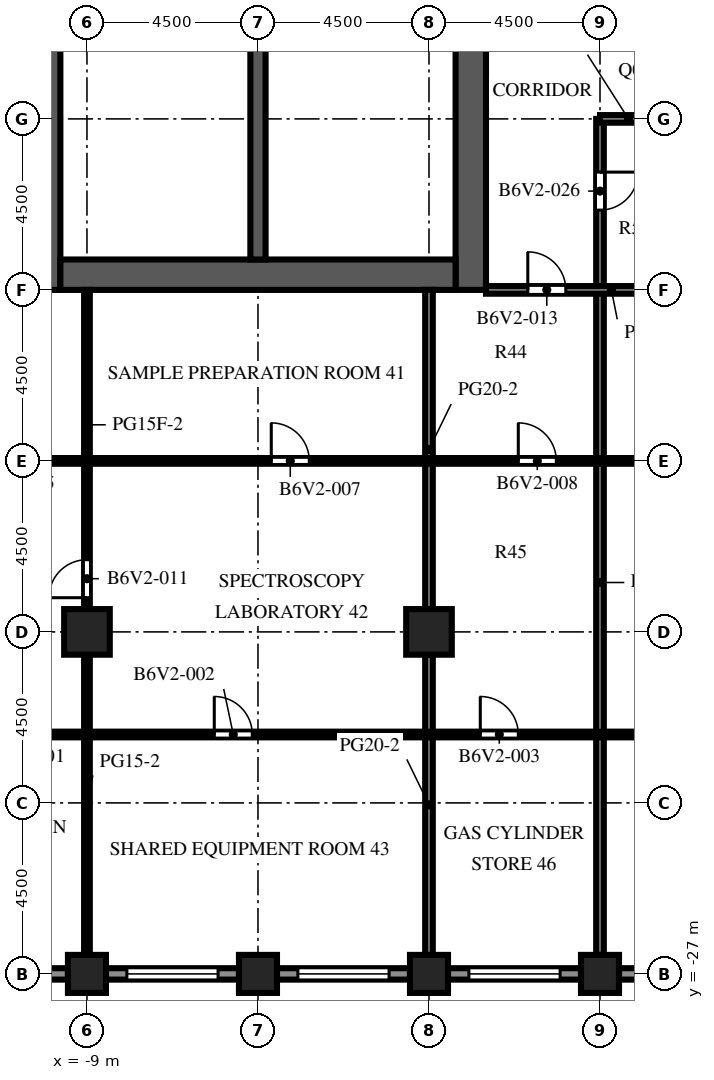
"""IFC4 building model, lengths in metres.
Left out: names, types, materials, properties, quantities, classifications, styles, units other than length and angle.
Written with IfcOpenShell. Run it as: python <this file> out.ifc"""

import sys

from ifc_helpers import new_model, si_unit, direction, frame, frame_2d, origin, origin_2d, place, context, subcontext, project, spatial, rectangle, extrude, element, fill, save


model = new_model("IFC4")
c1 = context("Model", 3, precision=1e-05, world=origin(), true_north=direction((0.0, 1.0)))
c2 = subcontext(c1, "Body", "Model", "MODEL_VIEW")
j1 = project(units=[si_unit("LENGTHUNIT", "METRE"), si_unit("PLANEANGLEUNIT", "RADIAN")], contexts=[c1])
p1 = place(None, origin())
s1 = spatial("IfcSite", under=j1, at=p1, CompositionType="ELEMENT")
p2 = place(p1, origin())
s2 = spatial("IfcBuilding", under=s1, at=p2, CompositionType="ELEMENT")
p3 = place(p2, frame((0.0, 0.0, 216.1)))
s3 = spatial("IfcBuildingStorey", under=s2, at=p3, CompositionType="ELEMENT", Elevation=216.1)
for number, where, z_axis, x_axis in (
    (1, (-9.0, -27.0, 0.0), (0.0, 0.0, 1.0), (1.0, 0.0, 0.0)),
    (2, (-4.5, -27.0, 0.0), (0.0, 0.0, 1.0), (1.0, 0.0, 0.0)),
    (3, (0.0, -27.0, 0.0), (0.0, 0.0, 1.0), (1.0, 0.0, 0.0)),
    (4, (4.5, -27.0, 0.0), (0.0, 0.0, 1.0), (1.0, 0.0, 0.0)),
):
    element("IfcColumn", number, at=place(p3, frame(where, z_axis=z_axis, x_axis=x_axis)), inside=s3, PredefinedType="COLUMN", context=c2, shape_type="SweptSolid", body=[
        extrude(rectangle(XDim=1.0, YDim=1.0, at=origin_2d()), origin(), (0.0, 0.0, 1.0), 4.1),
    ])
for number, where, z_axis, x_axis in (
    (5, (-9.0, -18.0, 0.0), (0.0, 0.0, 1.0), (1.0, 0.0, 0.0)),
    (6, (0.0, -18.0, 0.0), (0.0, 0.0, 1.0), (1.0, 0.0, 0.0)),
):
    element("IfcColumn", number, at=place(p3, frame(where, z_axis=z_axis, x_axis=x_axis)), inside=s3, PredefinedType="COLUMN", context=c2, shape_type="SweptSolid", body=[
        extrude(rectangle(XDim=1.2, YDim=1.2, at=origin_2d()), origin(), (0.0, 0.0, 1.0), 4.1),
    ])
p4 = place(p3, frame((-10.1, -9.0, 0.0), z_axis=(0.0, 0.0, 1.0), x_axis=(0.0, 1.0, 0.0)))
e7 = element("IfcWall", 7, at=p4, inside=s3, PredefinedType="SHEAR", context=c2, shape_type="SweptSolid", body=[
    extrude(rectangle(XDim=27.5, YDim=0.8, at=frame_2d((13.75, 0.0))), origin(), (0.0, 0.0, 1.0), 4.1),
])
p5 = place(p4, frame((12.55, 0.0, 0.0)))
e8 = element("IfcOpeningElement", 8, at=p5, cuts=e7, PredefinedType="OPENING", context=c2, shape_type="SweptSolid", body=[
    extrude(rectangle(XDim=2.4, YDim=2.4, at=frame_2d((1.2, 1.2))), frame((0.0, 0.41, 0.0), z_axis=(0.0, -1.0, 0.0), x_axis=(1.0, 0.0, 0.0)), (0.0, 0.0, 1.0), 0.82),
])
p6 = place(p4, frame((6.825, 0.0, 0.0)))
e9 = element("IfcOpeningElement", 9, at=p6, cuts=e7, PredefinedType="OPENING", context=c2, shape_type="SweptSolid", body=[
    extrude(rectangle(XDim=1.2, YDim=2.1, at=frame_2d((0.6, 1.05))), frame((0.0, 0.41, 0.0), z_axis=(0.0, -1.0, 0.0), x_axis=(1.0, 0.0, 0.0)), (0.0, 0.0, 1.0), 0.82),
])
p7 = place(p4, frame((19.475, 0.0, 0.0)))
e10 = element("IfcOpeningElement", 10, at=p7, cuts=e7, PredefinedType="OPENING", context=c2, shape_type="SweptSolid", body=[
    extrude(rectangle(XDim=1.2, YDim=2.1, at=frame_2d((0.6, 1.05))), frame((0.0, 0.41, 0.0), z_axis=(0.0, -1.0, 0.0), x_axis=(1.0, 0.0, 0.0)), (0.0, 0.0, 1.0), 0.82),
])
p8 = place(p3, frame((1.1, -9.0, 0.0), z_axis=(0.0, 0.0, 1.0), x_axis=(0.0, 1.0, 0.0)))
e11 = element("IfcWall", 11, at=p8, inside=s3, PredefinedType="SHEAR", context=c2, shape_type="SweptSolid", body=[
    extrude(rectangle(XDim=27.5, YDim=0.8, at=frame_2d((13.75, 0.0))), origin(), (0.0, 0.0, 1.0), 4.1),
])
p9 = place(p8, frame((12.55, 0.0, 0.0)))
e12 = element("IfcOpeningElement", 12, at=p9, cuts=e11, PredefinedType="OPENING", context=c2, shape_type="SweptSolid", body=[
    extrude(rectangle(XDim=2.4, YDim=2.4, at=frame_2d((1.2, 1.2))), frame((0.0, 0.41, 0.0), z_axis=(0.0, -1.0, 0.0), x_axis=(1.0, 0.0, 0.0)), (0.0, 0.0, 1.0), 0.82),
])
p10 = place(p8, frame((5.5, 0.0, 0.0)))
e13 = element("IfcOpeningElement", 13, at=p10, cuts=e11, PredefinedType="OPENING", context=c2, shape_type="SweptSolid", body=[
    extrude(rectangle(XDim=0.95, YDim=2.1, at=frame_2d((0.475, 1.05))), frame((0.0, 0.41, 0.0), z_axis=(0.0, -1.0, 0.0), x_axis=(1.0, 0.0, 0.0)), (0.0, 0.0, 1.0), 0.82),
])
p11 = place(p8, frame((23.475, 0.0, 0.0)))
e14 = element("IfcOpeningElement", 14, at=p11, cuts=e11, PredefinedType="OPENING", context=c2, shape_type="SweptSolid", body=[
    extrude(rectangle(XDim=1.2, YDim=2.1, at=frame_2d((0.6, 1.05))), frame((0.0, 0.41, 0.0), z_axis=(0.0, -1.0, 0.0), x_axis=(1.0, 0.0, 0.0)), (0.0, 0.0, 1.0), 0.82),
])
p12 = place(p3, frame((-9.7, -8.6, 0.0), z_axis=(0.0, 0.0, 1.0), x_axis=(1.0, 0.0, 0.0)))
e15 = element("IfcWall", 15, at=p12, inside=s3, PredefinedType="SHEAR", context=c2, shape_type="SweptSolid", body=[
    extrude(rectangle(XDim=10.4, YDim=0.8, at=frame_2d((5.2, 0.0))), origin(), (0.0, 0.0, 1.0), 4.1),
])
p13 = place(p3, frame((-4.5, -8.2, 0.0), z_axis=(0.0, 0.0, 1.0), x_axis=(0.0, 1.0, 0.0)))
e16 = element("IfcWall", 16, at=p13, inside=s3, PredefinedType="SHEAR", context=c2, shape_type="SweptSolid", body=[
    extrude(rectangle(XDim=7.5, YDim=0.4, at=frame_2d((3.75, 0.0))), origin(), (0.0, 0.0, 1.0), 4.1),
])
p14 = place(p3, frame((-9.5, -27.0, 0.0), z_axis=(0.0, 0.0, 1.0), x_axis=(-1.0, 0.0, 0.0)))
e17 = element("IfcWall", 17, at=p14, inside=s3, PredefinedType="SOLIDWALL", context=c2, shape_type="SweptSolid", body=[
    extrude(rectangle(XDim=3.5, YDim=0.3, at=frame_2d((1.75, 0.0))), origin(), (0.0, 0.0, 1.0), 2.7),
])
p15 = place(p14, frame((1.25, 0.0, 0.0)))
e18 = element("IfcOpeningElement", 18, at=p15, cuts=e17, PredefinedType="OPENING", context=c2, shape_type="SweptSolid", body=[
    extrude(rectangle(XDim=1.0, YDim=2.2, at=frame_2d((0.5, 1.1))), frame((0.0, 0.16, 0.0), z_axis=(0.0, -1.0, 0.0), x_axis=(1.0, 0.0, 0.0)), (0.0, 0.0, 1.0), 0.32),
])
p16 = place(p3, frame((-5.0, -27.0, 0.0), z_axis=(0.0, 0.0, 1.0), x_axis=(-1.0, 0.0, 0.0)))
e19 = element("IfcWall", 19, at=p16, inside=s3, PredefinedType="SOLIDWALL", context=c2, shape_type="SweptSolid", body=[
    extrude(rectangle(XDim=3.5, YDim=0.3, at=frame_2d((1.75, 0.0))), origin(), (0.0, 0.0, 1.0), 2.7),
])
p17 = place(p16, frame((0.55, 0.0, 0.8)))
e20 = element("IfcOpeningElement", 20, at=p17, cuts=e19, PredefinedType="OPENING", context=c2, shape_type="SweptSolid", body=[
    extrude(rectangle(XDim=2.4, YDim=1.7, at=frame_2d((1.2, 0.85))), frame((0.0, 0.16, 0.0), z_axis=(0.0, -1.0, 0.0), x_axis=(1.0, 0.0, 0.0)), (0.0, 0.0, 1.0), 0.32),
])
p18 = place(p3, frame((-0.5, -27.0, 0.0), z_axis=(0.0, 0.0, 1.0), x_axis=(-1.0, 0.0, 0.0)))
e21 = element("IfcWall", 21, at=p18, inside=s3, PredefinedType="SOLIDWALL", context=c2, shape_type="SweptSolid", body=[
    extrude(rectangle(XDim=3.5, YDim=0.3, at=frame_2d((1.75, 0.0))), origin(), (0.0, 0.0, 1.0), 2.7),
])
p19 = place(p18, frame((0.55, 0.0, 0.8)))
e22 = element("IfcOpeningElement", 22, at=p19, cuts=e21, PredefinedType="OPENING", context=c2, shape_type="SweptSolid", body=[
    extrude(rectangle(XDim=2.4, YDim=1.7, at=frame_2d((1.2, 0.85))), frame((0.0, 0.16, 0.0), z_axis=(0.0, -1.0, 0.0), x_axis=(1.0, 0.0, 0.0)), (0.0, 0.0, 1.0), 0.32),
])
p20 = place(p3, frame((4.0, -27.0, 0.0), z_axis=(0.0, 0.0, 1.0), x_axis=(-1.0, 0.0, 0.0)))
e23 = element("IfcWall", 23, at=p20, inside=s3, PredefinedType="SOLIDWALL", context=c2, shape_type="SweptSolid", body=[
    extrude(rectangle(XDim=3.5, YDim=0.3, at=frame_2d((1.75, 0.0))), origin(), (0.0, 0.0, 1.0), 2.7),
])
p21 = place(p20, frame((0.55, 0.0, 0.8)))
e24 = element("IfcOpeningElement", 24, at=p21, cuts=e23, PredefinedType="OPENING", context=c2, shape_type="SweptSolid", body=[
    extrude(rectangle(XDim=2.4, YDim=1.7, at=frame_2d((1.2, 0.85))), frame((0.0, 0.16, 0.0), z_axis=(0.0, -1.0, 0.0), x_axis=(1.0, 0.0, 0.0)), (0.0, 0.0, 1.0), 0.32),
])
p22 = place(p3, frame((8.5, -27.0, 0.0), z_axis=(0.0, 0.0, 1.0), x_axis=(-1.0, 0.0, 0.0)))
e25 = element("IfcWall", 25, at=p22, inside=s3, PredefinedType="SOLIDWALL", context=c2, shape_type="SweptSolid", body=[
    extrude(rectangle(XDim=3.5, YDim=0.3, at=frame_2d((1.75, 0.0))), origin(), (0.0, 0.0, 1.0), 2.7),
])
p23 = place(p22, frame((0.55, 0.0, 0.8)))
e26 = element("IfcOpeningElement", 26, at=p23, cuts=e25, PredefinedType="OPENING", context=c2, shape_type="SweptSolid", body=[
    extrude(rectangle(XDim=2.4, YDim=1.7, at=frame_2d((1.2, 0.85))), frame((0.0, 0.16, 0.0), z_axis=(0.0, -1.0, 0.0), x_axis=(1.0, 0.0, 0.0)), (0.0, 0.0, 1.0), 0.32),
])
p24 = place(p3, frame((-1.8, -3.7, 0.0), z_axis=(0.0, 0.0, 1.0), x_axis=(1.0, 0.0, 0.0)))
e27 = element("IfcWall", 27, at=p24, inside=s3, PredefinedType="PARTITIONING", context=c2, shape_type="SweptSolid", body=[
    extrude(rectangle(XDim=2.5, YDim=0.1, at=frame_2d((1.25, 0.0))), origin(), (0.0, 0.0, 1.0), 3.5),
])
p25 = place(p24, frame((0.75, 0.0, 0.0)))
e28 = element("IfcOpeningElement", 28, at=p25, cuts=e27, PredefinedType="OPENING", context=c2, shape_type="SweptSolid", body=[
    extrude(rectangle(XDim=1.0, YDim=2.1, at=frame_2d((0.5, 1.05))), frame((0.0, 0.06, 0.0), z_axis=(0.0, -1.0, 0.0), x_axis=(1.0, 0.0, 0.0)), (0.0, 0.0, 1.0), 0.12),
])
p26 = place(p3, frame((-4.3, -3.7, 0.0), z_axis=(0.0, 0.0, 1.0), x_axis=(1.0, 0.0, 0.0)))
e29 = element("IfcWall", 29, at=p26, inside=s3, PredefinedType="PARTITIONING", context=c2, shape_type="SweptSolid", body=[
    extrude(rectangle(XDim=2.5, YDim=0.1, at=frame_2d((1.25, 0.0))), origin(), (0.0, 0.0, 1.0), 3.5),
])
p27 = place(p26, frame((0.75, 0.0, 0.0)))
e30 = element("IfcOpeningElement", 30, at=p27, cuts=e29, PredefinedType="OPENING", context=c2, shape_type="SweptSolid", body=[
    extrude(rectangle(XDim=1.0, YDim=2.1, at=frame_2d((0.5, 1.05))), frame((0.0, 0.06, 0.0), z_axis=(0.0, -1.0, 0.0), x_axis=(1.0, 0.0, 0.0)), (0.0, 0.0, 1.0), 0.12),
])
p28 = place(p3, frame((-1.8, -8.2, 0.0), z_axis=(0.0, 0.0, 1.0), x_axis=(0.0, 1.0, 0.0)))
e31 = element("IfcWall", 31, at=p28, inside=s3, PredefinedType="PARTITIONING", context=c2, shape_type="SweptSolid", body=[
    extrude(rectangle(XDim=4.5, YDim=0.1, at=frame_2d((2.25, 0.0))), origin(), (0.0, 0.0, 1.0), 3.5),
])
p29 = place(p3, frame((-9.0, -26.5, 0.0), z_axis=(0.0, 0.0, 1.0), x_axis=(0.0, 1.0, 0.0)))
e32 = element("IfcWall", 32, at=p29, inside=s3, PredefinedType="PARTITIONING", context=c2, shape_type="SweptSolid", body=[
    extrude(rectangle(XDim=7.9, YDim=0.15, at=frame_2d((3.95, 0.0))), origin(), (0.0, 0.0, 1.0), 3.5),
])
p30 = place(p3, frame((-9.0, -9.0, 0.0), z_axis=(0.0, 0.0, 1.0), x_axis=(0.0, -1.0, 0.0)))
e33 = element("IfcWall", 33, at=p30, inside=s3, PredefinedType="PARTITIONING", context=c2, shape_type="SweptSolid", body=[
    extrude(rectangle(XDim=8.4, YDim=0.15, at=frame_2d((4.2, 0.0))), origin(), (0.0, 0.0, 1.0), 3.5),
])
p31 = place(p30, frame((7.1, 0.0, 0.0)))
e34 = element("IfcOpeningElement", 34, at=p31, cuts=e33, PredefinedType="OPENING", context=c2, shape_type="SweptSolid", body=[
    extrude(rectangle(XDim=1.0, YDim=2.1, at=frame_2d((0.5, 1.05))), frame((0.0, 0.085, 0.0), z_axis=(0.0, -1.0, 0.0), x_axis=(1.0, 0.0, 0.0)), (0.0, 0.0, 1.0), 0.17),
])
p32 = place(p3, frame((0.0, -26.5, 0.0), z_axis=(0.0, 0.0, 1.0), x_axis=(0.0, 1.0, 0.0)))
e35 = element("IfcWall", 35, at=p32, inside=s3, PredefinedType="PARTITIONING", context=c2, shape_type="SweptSolid", body=[
    extrude(rectangle(XDim=7.9, YDim=0.2, at=frame_2d((3.95, 0.0))), origin(), (0.0, 0.0, 1.0), 3.5),
])
p33 = place(p3, frame((0.0, -17.4, 0.0), z_axis=(0.0, 0.0, 1.0), x_axis=(0.0, 1.0, 0.0)))
e36 = element("IfcWall", 36, at=p33, inside=s3, PredefinedType="PARTITIONING", context=c2, shape_type="SweptSolid", body=[
    extrude(rectangle(XDim=8.4, YDim=0.2, at=frame_2d((4.2, 0.0))), origin(), (0.0, 0.0, 1.0), 3.5),
])
p34 = place(p3, frame((4.5, -4.5, 0.0), z_axis=(0.0, 0.0, 1.0), x_axis=(0.0, -1.0, 0.0)))
e37 = element("IfcWall", 37, at=p34, inside=s3, PredefinedType="PARTITIONING", context=c2, shape_type="SweptSolid", body=[
    extrude(rectangle(XDim=22.0, YDim=0.2, at=frame_2d((11.0, 0.0))), origin(), (0.0, 0.0, 1.0), 3.5),
])
p35 = place(p34, frame((1.4, 0.0, 0.0)))
e38 = element("IfcOpeningElement", 38, at=p35, cuts=e37, PredefinedType="OPENING", context=c2, shape_type="SweptSolid", body=[
    extrude(rectangle(XDim=1.0, YDim=2.1, at=frame_2d((0.5, 1.05))), frame((0.0, 0.11, 0.0), z_axis=(0.0, -1.0, 0.0), x_axis=(1.0, 0.0, 0.0)), (0.0, 0.0, 1.0), 0.22),
])
p36 = place(p3, frame((21.0, -20.7, 0.0), z_axis=(0.0, 0.0, 1.0), x_axis=(-1.0, 0.0, 0.0)))
e39 = element("IfcWall", 39, at=p36, inside=s3, PredefinedType="PARTITIONING", context=c2, shape_type="SweptSolid", body=[
    extrude(rectangle(XDim=34.5, YDim=0.15, at=frame_2d((17.25, 0.0))), origin(), (0.0, 0.0, 1.0), 3.5),
])
p37 = place(p36, frame((31.15, 0.0, 0.0)))
e40 = element("IfcOpeningElement", 40, at=p37, cuts=e39, PredefinedType="OPENING", context=c2, shape_type="SweptSolid", body=[
    extrude(rectangle(XDim=1.0, YDim=2.1, at=frame_2d((0.5, 1.05))), frame((0.0, 0.085, 0.0), z_axis=(0.0, -1.0, 0.0), x_axis=(1.0, 0.0, 0.0)), (0.0, 0.0, 1.0), 0.17),
])
p38 = place(p36, frame((25.65, 0.0, 0.0)))
e41 = element("IfcOpeningElement", 41, at=p38, cuts=e39, PredefinedType="OPENING", context=c2, shape_type="SweptSolid", body=[
    extrude(rectangle(XDim=1.0, YDim=2.1, at=frame_2d((0.5, 1.05))), frame((0.0, 0.085, 0.0), z_axis=(0.0, -1.0, 0.0), x_axis=(1.0, 0.0, 0.0)), (0.0, 0.0, 1.0), 0.17),
])
p39 = place(p36, frame((18.65, 0.0, 0.0)))
e42 = element("IfcOpeningElement", 42, at=p39, cuts=e39, PredefinedType="OPENING", context=c2, shape_type="SweptSolid", body=[
    extrude(rectangle(XDim=1.0, YDim=2.1, at=frame_2d((0.5, 1.05))), frame((0.0, 0.085, 0.0), z_axis=(0.0, -1.0, 0.0), x_axis=(1.0, 0.0, 0.0)), (0.0, 0.0, 1.0), 0.17),
])
p40 = place(p36, frame((7.65, 0.0, 0.0)))
e43 = element("IfcOpeningElement", 43, at=p40, cuts=e39, PredefinedType="OPENING", context=c2, shape_type="SweptSolid", body=[
    extrude(rectangle(XDim=1.0, YDim=2.1, at=frame_2d((0.5, 1.05))), frame((0.0, 0.085, 0.0), z_axis=(0.0, -1.0, 0.0), x_axis=(1.0, 0.0, 0.0)), (0.0, 0.0, 1.0), 0.17),
])
p41 = place(p3, frame((21.0, -13.5, 0.0), z_axis=(0.0, 0.0, 1.0), x_axis=(-1.0, 0.0, 0.0)))
e44 = element("IfcWall", 44, at=p41, inside=s3, PredefinedType="PARTITIONING", context=c2, shape_type="SweptSolid", body=[
    extrude(rectangle(XDim=34.5, YDim=0.15, at=frame_2d((17.25, 0.0))), origin(), (0.0, 0.0, 1.0), 3.5),
])
p42 = place(p41, frame((31.4, 0.0, 0.0)))
e45 = element("IfcOpeningElement", 45, at=p42, cuts=e44, PredefinedType="OPENING", context=c2, shape_type="SweptSolid", body=[
    extrude(rectangle(XDim=1.0, YDim=2.1, at=frame_2d((0.5, 1.05))), frame((0.0, 0.085, 0.0), z_axis=(0.0, -1.0, 0.0), x_axis=(1.0, 0.0, 0.0)), (0.0, 0.0, 1.0), 0.17),
])
p43 = place(p41, frame((24.15, 0.0, 0.0)))
e46 = element("IfcOpeningElement", 46, at=p43, cuts=e44, PredefinedType="OPENING", context=c2, shape_type="SweptSolid", body=[
    extrude(rectangle(XDim=1.0, YDim=2.1, at=frame_2d((0.5, 1.05))), frame((0.0, 0.085, 0.0), z_axis=(0.0, -1.0, 0.0), x_axis=(1.0, 0.0, 0.0)), (0.0, 0.0, 1.0), 0.17),
])
p44 = place(p41, frame((17.65, 0.0, 0.0)))
e47 = element("IfcOpeningElement", 47, at=p44, cuts=e44, PredefinedType="OPENING", context=c2, shape_type="SweptSolid", body=[
    extrude(rectangle(XDim=1.0, YDim=2.1, at=frame_2d((0.5, 1.05))), frame((0.0, 0.085, 0.0), z_axis=(0.0, -1.0, 0.0), x_axis=(1.0, 0.0, 0.0)), (0.0, 0.0, 1.0), 0.17),
])
p45 = place(p41, frame((7.65, 0.0, 0.0)))
e48 = element("IfcOpeningElement", 48, at=p45, cuts=e44, PredefinedType="OPENING", context=c2, shape_type="SweptSolid", body=[
    extrude(rectangle(XDim=1.0, YDim=2.1, at=frame_2d((0.5, 1.05))), frame((0.0, 0.085, 0.0), z_axis=(0.0, -1.0, 0.0), x_axis=(1.0, 0.0, 0.0)), (0.0, 0.0, 1.0), 0.17),
])
p46 = place(p3, frame((6.0, -9.0, 0.0), z_axis=(0.0, 0.0, 1.0), x_axis=(-1.0, 0.0, 0.0)))
e49 = element("IfcWall", 49, at=p46, inside=s3, PredefinedType="PARTITIONING", context=c2, shape_type="SweptSolid", body=[
    extrude(rectangle(XDim=4.5, YDim=0.2, at=frame_2d((2.25, 0.0))), origin(), (0.0, 0.0, 1.0), 3.5),
])
p47 = place(p46, frame((2.4, 0.0, 0.0)))
e50 = element("IfcOpeningElement", 50, at=p47, cuts=e49, PredefinedType="OPENING", context=c2, shape_type="SweptSolid", body=[
    extrude(rectangle(XDim=1.0, YDim=2.1, at=frame_2d((0.5, 1.05))), frame((0.0, 0.11, 0.0), z_axis=(0.0, -1.0, 0.0), x_axis=(1.0, 0.0, 0.0)), (0.0, 0.0, 1.0), 0.22),
])
p48 = place(p3, frame((4.5, -4.5, 0.0), z_axis=(0.0, 0.0, 1.0), x_axis=(1.0, 0.0, 0.0)))
e51 = element("IfcWall", 51, at=p48, inside=s3, PredefinedType="PARTITIONING", context=c2, shape_type="SweptSolid", body=[
    extrude(rectangle(XDim=1.5, YDim=0.2, at=frame_2d((0.75, 0.0))), origin(), (0.0, 0.0, 1.0), 3.5),
])
p49 = place(p17, origin())
e52 = element("IfcWindow", 52, at=p49, inside=s3, PartitioningType="SINGLE_PANEL", PredefinedType="WINDOW", context=c2, shape_type="SweptSolid", body=[
    extrude(rectangle(XDim=2.4, YDim=1.7, at=frame_2d((1.2, 0.85))), frame((0.0, 0.03, 0.0), z_axis=(0.0, -1.0, 0.0), x_axis=(1.0, 0.0, 0.0)), (0.0, 0.0, 1.0), 0.06),
])
fill(e20, e52)
p50 = place(p19, origin())
e53 = element("IfcWindow", 53, at=p50, inside=s3, PartitioningType="SINGLE_PANEL", PredefinedType="WINDOW", context=c2, shape_type="SweptSolid", body=[
    extrude(rectangle(XDim=2.4, YDim=1.7, at=frame_2d((1.2, 0.85))), frame((0.0, 0.03, 0.0), z_axis=(0.0, -1.0, 0.0), x_axis=(1.0, 0.0, 0.0)), (0.0, 0.0, 1.0), 0.06),
])
fill(e22, e53)
p51 = place(p21, origin())
e54 = element("IfcWindow", 54, at=p51, inside=s3, PartitioningType="SINGLE_PANEL", PredefinedType="WINDOW", context=c2, shape_type="SweptSolid", body=[
    extrude(rectangle(XDim=2.4, YDim=1.7, at=frame_2d((1.2, 0.85))), frame((0.0, 0.03, 0.0), z_axis=(0.0, -1.0, 0.0), x_axis=(1.0, 0.0, 0.0)), (0.0, 0.0, 1.0), 0.06),
])
fill(e24, e54)
p52 = place(p10, origin())
e55 = element("IfcDoor", 55, at=p52, inside=s3, OperationType="SINGLE_SWING_LEFT", PredefinedType="DOOR", context=c2, shape_type="SweptSolid", body=[
    extrude(rectangle(XDim=0.95, YDim=2.1, at=frame_2d((0.475, 1.05))), frame((0.0, 0.375, 0.0), z_axis=(0.0, -1.0, 0.0), x_axis=(1.0, 0.0, 0.0)), (0.0, 0.0, 1.0), 0.05),
])
fill(e13, e55)
p53 = place(p25, origin())
e56 = element("IfcDoor", 56, at=p53, inside=s3, OperationType="SINGLE_SWING_RIGHT", PredefinedType="DOOR", context=c2, shape_type="SweptSolid", body=[
    extrude(rectangle(XDim=1.0, YDim=2.1, at=frame_2d((0.5, 1.05))), frame((0.0, 0.025, 0.0), z_axis=(0.0, -1.0, 0.0), x_axis=(1.0, 0.0, 0.0)), (0.0, 0.0, 1.0), 0.05),
])
fill(e28, e56)
p54 = place(p27, origin())
e57 = element("IfcDoor", 57, at=p54, inside=s3, OperationType="SINGLE_SWING_LEFT", PredefinedType="DOOR", context=c2, shape_type="SweptSolid", body=[
    extrude(rectangle(XDim=1.0, YDim=2.1, at=frame_2d((0.5, 1.05))), frame((0.0, 0.025, 0.0), z_axis=(0.0, -1.0, 0.0), x_axis=(1.0, 0.0, 0.0)), (0.0, 0.0, 1.0), 0.05),
])
fill(e30, e57)
p55 = place(p38, origin())
e58 = element("IfcDoor", 58, at=p55, inside=s3, OperationType="SINGLE_SWING_RIGHT", PredefinedType="DOOR", context=c2, shape_type="SweptSolid", body=[
    extrude(rectangle(XDim=1.0, YDim=2.1, at=frame_2d((0.5, 1.05))), frame((0.0, 0.025, 0.0), z_axis=(0.0, -1.0, 0.0), x_axis=(1.0, 0.0, 0.0)), (0.0, 0.0, 1.0), 0.05),
])
fill(e41, e58)
p56 = place(p39, origin())
e59 = element("IfcDoor", 59, at=p56, inside=s3, OperationType="SINGLE_SWING_RIGHT", PredefinedType="DOOR", context=c2, shape_type="SweptSolid", body=[
    extrude(rectangle(XDim=1.0, YDim=2.1, at=frame_2d((0.5, 1.05))), frame((0.0, 0.025, 0.0), z_axis=(0.0, -1.0, 0.0), x_axis=(1.0, 0.0, 0.0)), (0.0, 0.0, 1.0), 0.05),
])
fill(e42, e59)
p57 = place(p43, origin())
e60 = element("IfcDoor", 60, at=p57, inside=s3, OperationType="SINGLE_SWING_RIGHT", PredefinedType="DOOR", context=c2, shape_type="SweptSolid", body=[
    extrude(rectangle(XDim=1.0, YDim=2.1, at=frame_2d((0.5, 1.05))), frame((0.0, 0.025, 0.0), z_axis=(0.0, -1.0, 0.0), x_axis=(1.0, 0.0, 0.0)), (0.0, 0.0, 1.0), 0.05),
])
fill(e46, e60)
p58 = place(p44, origin())
e61 = element("IfcDoor", 61, at=p58, inside=s3, OperationType="SINGLE_SWING_RIGHT", PredefinedType="DOOR", context=c2, shape_type="SweptSolid", body=[
    extrude(rectangle(XDim=1.0, YDim=2.1, at=frame_2d((0.5, 1.05))), frame((0.0, 0.025, 0.0), z_axis=(0.0, -1.0, 0.0), x_axis=(1.0, 0.0, 0.0)), (0.0, 0.0, 1.0), 0.05),
])
fill(e47, e61)
p59 = place(p31, origin())
e62 = element("IfcDoor", 62, at=p59, inside=s3, OperationType="SINGLE_SWING_RIGHT", PredefinedType="DOOR", context=c2, shape_type="SweptSolid", body=[
    extrude(rectangle(XDim=1.0, YDim=2.1, at=frame_2d((0.5, 1.05))), frame((0.0, 0.025, 0.0), z_axis=(0.0, -1.0, 0.0), x_axis=(1.0, 0.0, 0.0)), (0.0, 0.0, 1.0), 0.05),
])
fill(e34, e62)
p60 = place(p47, origin())
e63 = element("IfcDoor", 63, at=p60, inside=s3, OperationType="SINGLE_SWING_RIGHT", PredefinedType="DOOR", context=c2, shape_type="SweptSolid", body=[
    extrude(rectangle(XDim=1.0, YDim=2.1, at=frame_2d((0.5, 1.05))), frame((0.0, 0.025, 0.0), z_axis=(0.0, -1.0, 0.0), x_axis=(1.0, 0.0, 0.0)), (0.0, 0.0, 1.0), 0.05),
])
fill(e50, e63)
p61 = place(p35, origin())
e64 = element("IfcDoor", 64, at=p61, inside=s3, OperationType="SINGLE_SWING_LEFT", PredefinedType="DOOR", context=c2, shape_type="SweptSolid", body=[
    extrude(rectangle(XDim=1.0, YDim=2.1, at=frame_2d((0.5, 1.05))), frame((0.0, 0.025, 0.0), z_axis=(0.0, -1.0, 0.0), x_axis=(1.0, 0.0, 0.0)), (0.0, 0.0, 1.0), 0.05),
])
fill(e38, e64)
save(model, sys.argv[1])
